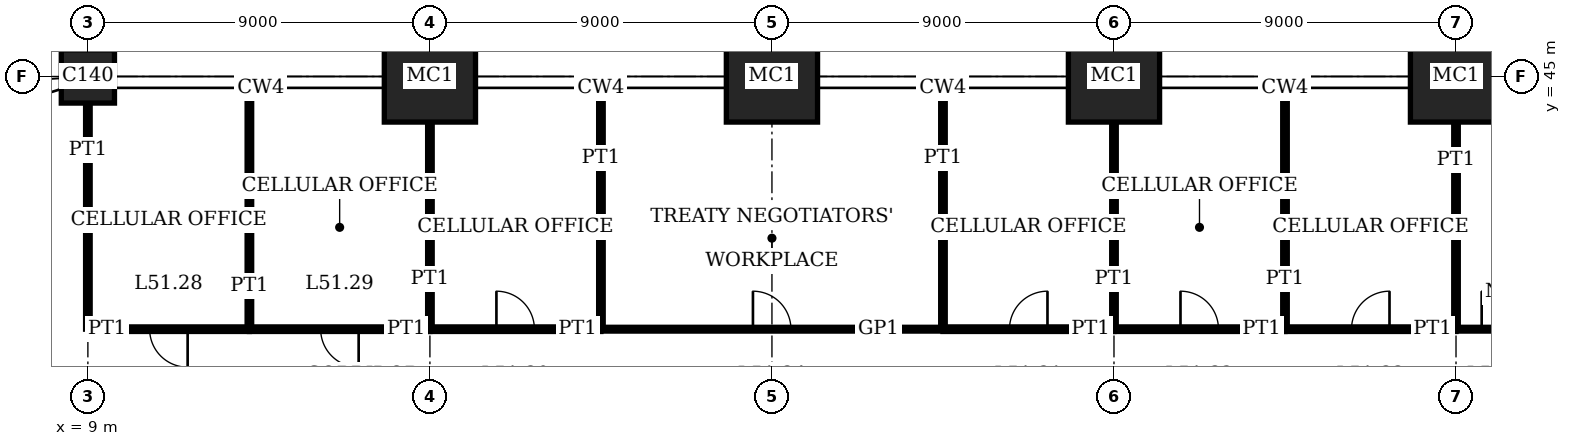
"""IFC4 building model, lengths in metres.
Left out: names, types, materials, properties, quantities, classifications, styles, units other than length and angle.
Written with IfcOpenShell. Run it as: python <this file> out.ifc"""

import sys

from ifc_helpers import new_model, si_unit, direction, frame, frame_2d, origin, origin_2d, place, context, subcontext, project, spatial, rectangle, extrude, element, fill, save


model = new_model("IFC4")
c1 = context("Model", 3, precision=1e-05, world=origin(), true_north=direction((0.0, 1.0)))
c2 = subcontext(c1, "Body", "Model", "MODEL_VIEW")
j1 = project(units=[si_unit("LENGTHUNIT", "METRE"), si_unit("PLANEANGLEUNIT", "RADIAN")], contexts=[c1])
p1 = place(None, origin())
s1 = spatial("IfcSite", under=j1, at=p1, CompositionType="ELEMENT")
p2 = place(p1, origin())
s2 = spatial("IfcBuilding", under=s1, at=p2, CompositionType="ELEMENT")
p3 = place(p2, frame((0.0, 0.0, 210.2)))
s3 = spatial("IfcBuildingStorey", under=s2, at=p3, CompositionType="ELEMENT", Elevation=210.2)
p4 = place(p3, frame((9.0, 45.0, 0.0), z_axis=(0.0, 0.0, 1.0), x_axis=(1.0, 0.0, 0.0)))
e1 = element("IfcColumn", 1, at=p4, inside=s3, PredefinedType="COLUMN", context=c2, shape_type="SweptSolid", body=[
    extrude(rectangle(XDim=1.4, YDim=1.4, at=origin_2d()), origin(), (0.0, 0.0, 1.0), 4.0),
])
for number, where, z_axis, x_axis in (
    (2, (18.0, 45.0, 0.0), (0.0, 0.0, 1.0), (1.0, 0.0, 0.0)),
    (3, (27.0, 45.0, 0.0), (0.0, 0.0, 1.0), (1.0, 0.0, 0.0)),
    (4, (36.0, 45.0, 0.0), (0.0, 0.0, 1.0), (1.0, 0.0, 0.0)),
    (5, (45.0, 45.0, 0.0), (0.0, 0.0, 1.0), (1.0, 0.0, 0.0)),
):
    element("IfcColumn", number, at=place(p3, frame(where, z_axis=z_axis, x_axis=x_axis)), inside=s3, PredefinedType="COLUMN", context=c2, shape_type="SweptSolid", body=[
        extrude(rectangle(XDim=2.4, YDim=2.4, at=origin_2d()), origin(), (0.0, 0.0, 1.0), 4.0),
    ])
p5 = place(p3, frame((9.0, 38.35, 0.0), z_axis=(0.0, 0.0, 1.0), x_axis=(1.0, 0.0, 0.0)))
e6 = element("IfcWall", 6, at=p5, inside=s3, PredefinedType="PARTITIONING", context=c2, shape_type="SweptSolid", body=[
    extrude(rectangle(XDim=4.25, YDim=0.12, at=frame_2d((2.125, 0.0))), origin(), (0.0, 0.0, 1.0), 3.75),
])
p6 = place(p5, frame((1.625, 0.0, 0.0)))
e7 = element("IfcOpeningElement", 7, at=p6, cuts=e6, PredefinedType="OPENING", context=c2, shape_type="SweptSolid", body=[
    extrude(rectangle(XDim=1.0, YDim=2.4, at=frame_2d((0.5, 1.2))), frame((0.0, 0.07, 0.0), z_axis=(0.0, -1.0, 0.0), x_axis=(1.0, 0.0, 0.0)), (0.0, 0.0, 1.0), 0.14),
])
p7 = place(p3, frame((13.25, 38.35, 0.0), z_axis=(0.0, 0.0, 1.0), x_axis=(1.0, 0.0, 0.0)))
e8 = element("IfcWall", 8, at=p7, inside=s3, PredefinedType="PARTITIONING", context=c2, shape_type="SweptSolid", body=[
    extrude(rectangle(XDim=4.75, YDim=0.12, at=frame_2d((2.375, 0.0))), origin(), (0.0, 0.0, 1.0), 3.75),
])
p8 = place(p7, frame((1.875, 0.0, 0.0)))
e9 = element("IfcOpeningElement", 9, at=p8, cuts=e8, PredefinedType="OPENING", context=c2, shape_type="SweptSolid", body=[
    extrude(rectangle(XDim=1.0, YDim=2.4, at=frame_2d((0.5, 1.2))), frame((0.0, 0.07, 0.0), z_axis=(0.0, -1.0, 0.0), x_axis=(1.0, 0.0, 0.0)), (0.0, 0.0, 1.0), 0.14),
])
p9 = place(p3, frame((18.0, 38.35, 0.0), z_axis=(0.0, 0.0, 1.0), x_axis=(1.0, 0.0, 0.0)))
e10 = element("IfcWall", 10, at=p9, inside=s3, PredefinedType="PARTITIONING", context=c2, shape_type="SweptSolid", body=[
    extrude(rectangle(XDim=4.5, YDim=0.12, at=frame_2d((2.25, 0.0))), origin(), (0.0, 0.0, 1.0), 3.75),
])
p10 = place(p9, frame((1.75, 0.0, 0.0)))
e11 = element("IfcOpeningElement", 11, at=p10, cuts=e10, PredefinedType="OPENING", context=c2, shape_type="SweptSolid", body=[
    extrude(rectangle(XDim=1.0, YDim=2.4, at=frame_2d((0.5, 1.2))), frame((0.0, 0.07, 0.0), z_axis=(0.0, -1.0, 0.0), x_axis=(1.0, 0.0, 0.0)), (0.0, 0.0, 1.0), 0.14),
])
p11 = place(p3, frame((31.5, 38.35, 0.0), z_axis=(0.0, 0.0, 1.0), x_axis=(1.0, 0.0, 0.0)))
e12 = element("IfcWall", 12, at=p11, inside=s3, PredefinedType="PARTITIONING", context=c2, shape_type="SweptSolid", body=[
    extrude(rectangle(XDim=4.5, YDim=0.12, at=frame_2d((2.25, 0.0))), origin(), (0.0, 0.0, 1.0), 3.75),
])
p12 = place(p11, frame((1.75, 0.0, 0.0)))
e13 = element("IfcOpeningElement", 13, at=p12, cuts=e12, PredefinedType="OPENING", context=c2, shape_type="SweptSolid", body=[
    extrude(rectangle(XDim=1.0, YDim=2.4, at=frame_2d((0.5, 1.2))), frame((0.0, 0.07, 0.0), z_axis=(0.0, -1.0, 0.0), x_axis=(1.0, 0.0, 0.0)), (0.0, 0.0, 1.0), 0.14),
])
p13 = place(p3, frame((36.0, 38.35, 0.0), z_axis=(0.0, 0.0, 1.0), x_axis=(1.0, 0.0, 0.0)))
e14 = element("IfcWall", 14, at=p13, inside=s3, PredefinedType="PARTITIONING", context=c2, shape_type="SweptSolid", body=[
    extrude(rectangle(XDim=4.5, YDim=0.12, at=frame_2d((2.25, 0.0))), origin(), (0.0, 0.0, 1.0), 3.75),
])
p14 = place(p13, frame((1.75, 0.0, 0.0)))
e15 = element("IfcOpeningElement", 15, at=p14, cuts=e14, PredefinedType="OPENING", context=c2, shape_type="SweptSolid", body=[
    extrude(rectangle(XDim=1.0, YDim=2.4, at=frame_2d((0.5, 1.2))), frame((0.0, 0.07, 0.0), z_axis=(0.0, -1.0, 0.0), x_axis=(1.0, 0.0, 0.0)), (0.0, 0.0, 1.0), 0.14),
])
p15 = place(p3, frame((40.5, 38.35, 0.0), z_axis=(0.0, 0.0, 1.0), x_axis=(1.0, 0.0, 0.0)))
e16 = element("IfcWall", 16, at=p15, inside=s3, PredefinedType="PARTITIONING", context=c2, shape_type="SweptSolid", body=[
    extrude(rectangle(XDim=4.5, YDim=0.12, at=frame_2d((2.25, 0.0))), origin(), (0.0, 0.0, 1.0), 3.75),
])
p16 = place(p15, frame((1.75, 0.0, 0.0)))
e17 = element("IfcOpeningElement", 17, at=p16, cuts=e16, PredefinedType="OPENING", context=c2, shape_type="SweptSolid", body=[
    extrude(rectangle(XDim=1.0, YDim=2.4, at=frame_2d((0.5, 1.2))), frame((0.0, 0.07, 0.0), z_axis=(0.0, -1.0, 0.0), x_axis=(1.0, 0.0, 0.0)), (0.0, 0.0, 1.0), 0.14),
])
p17 = place(p3, frame((22.5, 38.35, 0.0), z_axis=(0.0, 0.0, 1.0), x_axis=(1.0, 0.0, 0.0)))
e18 = element("IfcWall", 18, at=p17, inside=s3, PredefinedType="PARTITIONING", context=c2, shape_type="SweptSolid", body=[
    extrude(rectangle(XDim=9.0, YDim=0.1, at=frame_2d((4.5, 0.0))), origin(), (0.0, 0.0, 1.0), 3.75),
])
p18 = place(p17, frame((4.0, 0.0, 0.0)))
e19 = element("IfcOpeningElement", 19, at=p18, cuts=e18, PredefinedType="OPENING", context=c2, shape_type="SweptSolid", body=[
    extrude(rectangle(XDim=1.0, YDim=2.4, at=frame_2d((0.5, 1.2))), frame((0.0, 0.06, 0.0), z_axis=(0.0, -1.0, 0.0), x_axis=(1.0, 0.0, 0.0)), (0.0, 0.0, 1.0), 0.12),
])
p19 = place(p3, frame((45.0, 38.35, 0.0), z_axis=(0.0, 0.0, 1.0), x_axis=(1.0, 0.0, 0.0)))
e20 = element("IfcWall", 20, at=p19, inside=s3, PredefinedType="PARTITIONING", context=c2, shape_type="SweptSolid", body=[
    extrude(rectangle(XDim=2.35, YDim=0.1, at=frame_2d((1.175, 0.0))), origin(), (0.0, 0.0, 1.0), 3.75),
])
p20 = place(p19, frame((0.675, 0.0, 0.0)))
e21 = element("IfcOpeningElement", 21, at=p20, cuts=e20, PredefinedType="OPENING", context=c2, shape_type="SweptSolid", body=[
    extrude(rectangle(XDim=1.0, YDim=2.4, at=frame_2d((0.5, 1.2))), frame((0.0, 0.06, 0.0), z_axis=(0.0, -1.0, 0.0), x_axis=(1.0, 0.0, 0.0)), (0.0, 0.0, 1.0), 0.12),
])
p21 = place(p3, frame((9.0, 38.35, 0.0), z_axis=(0.0, 0.0, 1.0), x_axis=(0.0, 1.0, 0.0)))
e22 = element("IfcWall", 22, at=p21, inside=s3, PredefinedType="PARTITIONING", context=c2, shape_type="SweptSolid", body=[
    extrude(rectangle(XDim=5.95, YDim=0.12, at=frame_2d((2.975, 0.0))), origin(), (0.0, 0.0, 1.0), 3.05),
])
p22 = place(p3, frame((13.25, 38.35, 0.0), z_axis=(0.0, 0.0, 1.0), x_axis=(0.0, 1.0, 0.0)))
e23 = element("IfcWall", 23, at=p22, inside=s3, PredefinedType="PARTITIONING", context=c2, shape_type="SweptSolid", body=[
    extrude(rectangle(XDim=6.34, YDim=0.12, at=frame_2d((3.17, 0.0))), origin(), (0.0, 0.0, 1.0), 3.75),
])
p23 = place(p3, frame((18.0, 38.35, 0.0), z_axis=(0.0, 0.0, 1.0), x_axis=(0.0, 1.0, 0.0)))
e24 = element("IfcWall", 24, at=p23, inside=s3, PredefinedType="PARTITIONING", context=c2, shape_type="SweptSolid", body=[
    extrude(rectangle(XDim=5.45, YDim=0.12, at=frame_2d((2.725, 0.0))), origin(), (0.0, 0.0, 1.0), 3.05),
])
for number, where, z_axis, x_axis in (
    (25, (22.5, 38.35, 0.0), (0.0, 0.0, 1.0), (0.0, 1.0, 0.0)),
    (26, (31.5, 38.35, 0.0), (0.0, 0.0, 1.0), (0.0, 1.0, 0.0)),
):
    element("IfcWall", number, at=place(p3, frame(where, z_axis=z_axis, x_axis=x_axis)), inside=s3, PredefinedType="PARTITIONING", context=c2, shape_type="SweptSolid", body=[
        extrude(rectangle(XDim=6.34, YDim=0.12, at=frame_2d((3.17, 0.0))), origin(), (0.0, 0.0, 1.0), 3.75),
    ])
p24 = place(p3, frame((36.0, 38.35, 0.0), z_axis=(0.0, 0.0, 1.0), x_axis=(0.0, 1.0, 0.0)))
e27 = element("IfcWall", 27, at=p24, inside=s3, PredefinedType="PARTITIONING", context=c2, shape_type="SweptSolid", body=[
    extrude(rectangle(XDim=5.45, YDim=0.12, at=frame_2d((2.725, 0.0))), origin(), (0.0, 0.0, 1.0), 3.05),
])
p25 = place(p3, frame((40.5, 38.35, 0.0), z_axis=(0.0, 0.0, 1.0), x_axis=(0.0, 1.0, 0.0)))
e28 = element("IfcWall", 28, at=p25, inside=s3, PredefinedType="PARTITIONING", context=c2, shape_type="SweptSolid", body=[
    extrude(rectangle(XDim=6.34, YDim=0.12, at=frame_2d((3.17, 0.0))), origin(), (0.0, 0.0, 1.0), 3.75),
])
p26 = place(p3, frame((45.0, 38.35, 0.0), z_axis=(0.0, 0.0, 1.0), x_axis=(0.0, 1.0, 0.0)))
e29 = element("IfcWall", 29, at=p26, inside=s3, PredefinedType="PARTITIONING", context=c2, shape_type="SweptSolid", body=[
    extrude(rectangle(XDim=5.45, YDim=0.12, at=frame_2d((2.725, 0.0))), origin(), (0.0, 0.0, 1.0), 3.05),
])
p27 = place(p6, origin())
e30 = element("IfcDoor", 30, at=p27, inside=s3, OperationType="SINGLE_SWING_RIGHT", PredefinedType="DOOR", context=c2, shape_type="SweptSolid", body=[
    extrude(rectangle(XDim=1.0, YDim=2.4, at=frame_2d((0.5, 1.2))), frame((0.0, 0.025, 0.0), z_axis=(0.0, -1.0, 0.0), x_axis=(1.0, 0.0, 0.0)), (0.0, 0.0, 1.0), 0.05),
])
fill(e7, e30)
p28 = place(p8, origin())
e31 = element("IfcDoor", 31, at=p28, inside=s3, OperationType="SINGLE_SWING_RIGHT", PredefinedType="DOOR", context=c2, shape_type="SweptSolid", body=[
    extrude(rectangle(XDim=1.0, YDim=2.4, at=frame_2d((0.5, 1.2))), frame((0.0, 0.025, 0.0), z_axis=(0.0, -1.0, 0.0), x_axis=(1.0, 0.0, 0.0)), (0.0, 0.0, 1.0), 0.05),
])
fill(e9, e31)
p29 = place(p10, origin())
e32 = element("IfcDoor", 32, at=p29, inside=s3, OperationType="SINGLE_SWING_RIGHT", PredefinedType="DOOR", context=c2, shape_type="SweptSolid", body=[
    extrude(rectangle(XDim=1.0, YDim=2.4, at=frame_2d((0.5, 1.2))), frame((0.0, 0.025, 0.0), z_axis=(0.0, -1.0, 0.0), x_axis=(1.0, 0.0, 0.0)), (0.0, 0.0, 1.0), 0.05),
])
fill(e11, e32)
p30 = place(p12, origin())
e33 = element("IfcDoor", 33, at=p30, inside=s3, OperationType="SINGLE_SWING_LEFT", PredefinedType="DOOR", context=c2, shape_type="SweptSolid", body=[
    extrude(rectangle(XDim=1.0, YDim=2.4, at=frame_2d((0.5, 1.2))), frame((0.0, 0.025, 0.0), z_axis=(0.0, -1.0, 0.0), x_axis=(1.0, 0.0, 0.0)), (0.0, 0.0, 1.0), 0.05),
])
fill(e13, e33)
p31 = place(p14, origin())
e34 = element("IfcDoor", 34, at=p31, inside=s3, OperationType="SINGLE_SWING_RIGHT", PredefinedType="DOOR", context=c2, shape_type="SweptSolid", body=[
    extrude(rectangle(XDim=1.0, YDim=2.4, at=frame_2d((0.5, 1.2))), frame((0.0, 0.025, 0.0), z_axis=(0.0, -1.0, 0.0), x_axis=(1.0, 0.0, 0.0)), (0.0, 0.0, 1.0), 0.05),
])
fill(e15, e34)
p32 = place(p16, origin())
e35 = element("IfcDoor", 35, at=p32, inside=s3, OperationType="SINGLE_SWING_LEFT", PredefinedType="DOOR", context=c2, shape_type="SweptSolid", body=[
    extrude(rectangle(XDim=1.0, YDim=2.4, at=frame_2d((0.5, 1.2))), frame((0.0, 0.025, 0.0), z_axis=(0.0, -1.0, 0.0), x_axis=(1.0, 0.0, 0.0)), (0.0, 0.0, 1.0), 0.05),
])
fill(e17, e35)
p33 = place(p18, origin())
e36 = element("IfcDoor", 36, at=p33, inside=s3, OperationType="SINGLE_SWING_RIGHT", PredefinedType="DOOR", context=c2, shape_type="SweptSolid", body=[
    extrude(rectangle(XDim=1.0, YDim=2.4, at=frame_2d((0.5, 1.2))), frame((0.0, 0.02, 0.0), z_axis=(0.0, -1.0, 0.0), x_axis=(1.0, 0.0, 0.0)), (0.0, 0.0, 1.0), 0.04),
])
fill(e19, e36)
p34 = place(p20, origin())
e37 = element("IfcDoor", 37, at=p34, inside=s3, OperationType="SINGLE_SWING_RIGHT", PredefinedType="DOOR", context=c2, shape_type="SweptSolid", body=[
    extrude(rectangle(XDim=1.0, YDim=2.4, at=frame_2d((0.5, 1.2))), frame((0.0, 0.02, 0.0), z_axis=(0.0, -1.0, 0.0), x_axis=(1.0, 0.0, 0.0)), (0.0, 0.0, 1.0), 0.04),
])
fill(e21, e37)
save(model, sys.argv[1])
